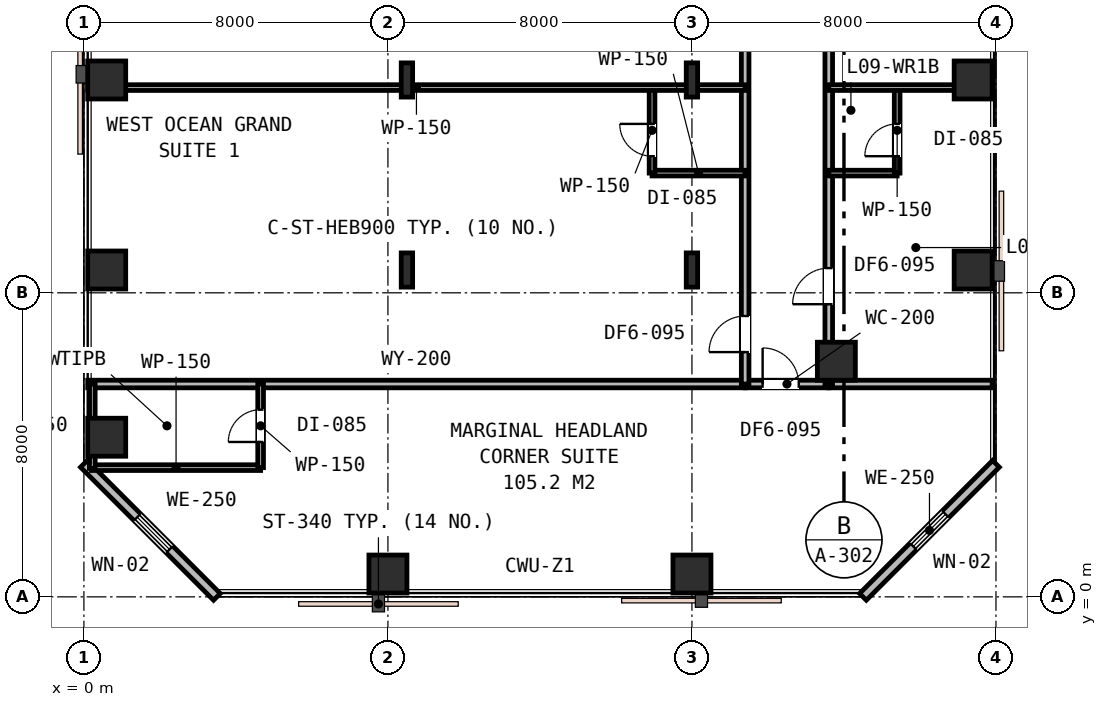
"""IFC4 building model, lengths in metres.
Left out: names, types, materials, properties, quantities, classifications, styles, units other than length and angle.
Written with IfcOpenShell. Run it as: python <this file> out.ifc"""

import sys

from ifc_helpers import new_model, si_unit, direction, frame, frame_2d, origin, origin_2d, place, context, subcontext, project, spatial, rectangle, i_section, extrude, element, fill, save


model = new_model("IFC4")
c1 = context("Model", 3, precision=1e-05, world=origin(), true_north=direction((0.0, 1.0)))
c2 = subcontext(c1, "Body", "Model", "MODEL_VIEW")
j1 = project(units=[si_unit("LENGTHUNIT", "METRE"), si_unit("PLANEANGLEUNIT", "RADIAN")], contexts=[c1])
p1 = place(None, origin())
s1 = spatial("IfcSite", under=j1, at=p1, CompositionType="ELEMENT")
p2 = place(p1, origin())
s2 = spatial("IfcBuilding", under=s1, at=p2, CompositionType="ELEMENT")
p3 = place(p2, frame((0.0, 0.0, 40.2)))
s3 = spatial("IfcBuildingStorey", under=s2, at=p3, CompositionType="ELEMENT", Elevation=40.2)
for number, where, z_axis, x_axis in (
    (1, (0.6, 8.6, 0.0), (0.0, 0.0, 1.0), (1.0, 0.0, 0.0)),
    (2, (0.6, 13.6, 0.0), (0.0, 0.0, 1.0), (1.0, 0.0, 0.0)),
    (3, (0.6, 4.2, 0.0), (0.0, 0.0, 1.0), (1.0, 0.0, 0.0)),
    (4, (8.0, 0.6, 0.0), (0.0, 0.0, 1.0), (1.0, 0.0, 0.0)),
    (5, (16.0, 0.6, 0.0), (0.0, 0.0, 1.0), (1.0, 0.0, 0.0)),
    (6, (19.8, 6.2, 0.0), (0.0, 0.0, 1.0), (1.0, 0.0, 0.0)),
    (7, (23.4, 8.6, 0.0), (0.0, 0.0, 1.0), (1.0, 0.0, 0.0)),
    (8, (23.4, 13.6, 0.0), (0.0, 0.0, 1.0), (1.0, 0.0, 0.0)),
):
    element("IfcColumn", number, at=place(p3, frame(where, z_axis=z_axis, x_axis=x_axis)), inside=s3, PredefinedType="COLUMN", context=c2, shape_type="SweptSolid", body=[
        extrude(rectangle(XDim=1.0, YDim=1.0, at=origin_2d()), origin(), (0.0, 0.0, 1.0), 3.6),
    ])
for number, where, z_axis, x_axis in (
    (9, (8.5, 8.6, 0.0), (0.0, 0.0, 1.0), (1.0, 0.0, 0.0)),
    (10, (16.0, 8.6, 0.0), (0.0, 0.0, 1.0), (1.0, 0.0, 0.0)),
    (11, (8.5, 13.6, 0.0), (0.0, 0.0, 1.0), (1.0, 0.0, 0.0)),
    (12, (16.0, 13.6, 0.0), (0.0, 0.0, 1.0), (1.0, 0.0, 0.0)),
):
    element("IfcColumn", number, at=place(p3, frame(where, z_axis=z_axis, x_axis=x_axis)), inside=s3, PredefinedType="COLUMN", context=c2, shape_type="SweptSolid", body=[
        extrude(i_section(OverallWidth=0.3, OverallDepth=0.9, WebThickness=0.018, FlangeThickness=0.035, FilletRadius=0.03, at=origin_2d()), origin(), (0.0, 0.0, 1.0), 3.6),
    ])
p4 = place(p3, frame((20.5, 0.0, 0.0), z_axis=(0.0, 0.0, 1.0), x_axis=(0.707106781187, 0.707106781187, 0.0)))
e13 = element("IfcWall", 13, at=p4, inside=s3, PredefinedType="STANDARD", context=c2, shape_type="SweptSolid", body=[
    extrude(rectangle(XDim=4.95, YDim=0.25, at=frame_2d((2.475, 0.0))), origin(), (0.0, 0.0, 1.0), 3.33),
])
p5 = place(p4, frame((1.875, 0.0, 0.85)))
e14 = element("IfcOpeningElement", 14, at=p5, cuts=e13, PredefinedType="OPENING", context=c2, shape_type="SweptSolid", body=[
    extrude(rectangle(XDim=1.2, YDim=1.6, at=frame_2d((0.6, 0.8))), frame((0.0, 0.135, 0.0), z_axis=(0.0, -1.0, 0.0), x_axis=(1.0, 0.0, 0.0)), (0.0, 0.0, 1.0), 0.27),
])
p6 = place(p3, frame((0.0, 3.5, 0.0), z_axis=(0.0, 0.0, 1.0), x_axis=(0.707106781187, -0.707106781187, 0.0)))
e15 = element("IfcWall", 15, at=p6, inside=s3, PredefinedType="STANDARD", context=c2, shape_type="SweptSolid", body=[
    extrude(rectangle(XDim=4.95, YDim=0.25, at=frame_2d((2.475, 0.0))), origin(), (0.0, 0.0, 1.0), 3.33),
])
p7 = place(p6, frame((1.985, 0.0, 0.85)))
e16 = element("IfcOpeningElement", 16, at=p7, cuts=e15, PredefinedType="OPENING", context=c2, shape_type="SweptSolid", body=[
    extrude(rectangle(XDim=1.2, YDim=1.6, at=frame_2d((0.6, 0.8))), frame((0.0, 0.135, 0.0), z_axis=(0.0, -1.0, 0.0), x_axis=(1.0, 0.0, 0.0)), (0.0, 0.0, 1.0), 0.27),
])
p8 = place(p3, frame((0.1, 5.6, 0.0), z_axis=(0.0, 0.0, 1.0), x_axis=(1.0, 0.0, 0.0)))
e17 = element("IfcWall", 17, at=p8, inside=s3, PredefinedType="PARTITIONING", context=c2, shape_type="SweptSolid", body=[
    extrude(rectangle(XDim=17.3, YDim=0.2, at=frame_2d((8.65, 0.0))), origin(), (0.0, 0.0, 1.0), 2.82),
])
p9 = place(p3, frame((19.6, 5.6, 0.0), z_axis=(0.0, 0.0, 1.0), x_axis=(1.0, 0.0, 0.0)))
e18 = element("IfcWall", 18, at=p9, inside=s3, PredefinedType="PARTITIONING", context=c2, shape_type="SweptSolid", body=[
    extrude(rectangle(XDim=4.3, YDim=0.2, at=frame_2d((2.15, 0.0))), origin(), (0.0, 0.0, 1.0), 3.33),
])
p10 = place(p3, frame((17.4, 5.6, 0.0), z_axis=(0.0, 0.0, 1.0), x_axis=(1.0, 0.0, 0.0)))
e19 = element("IfcWall", 19, at=p10, inside=s3, PredefinedType="PARTITIONING", context=c2, shape_type="SweptSolid", body=[
    extrude(rectangle(XDim=2.2, YDim=0.2, at=frame_2d((1.1, 0.0))), origin(), (0.0, 0.0, 1.0), 3.33),
])
p11 = place(p10, frame((0.46, 0.0, 0.0)))
e20 = element("IfcOpeningElement", 20, at=p11, cuts=e19, PredefinedType="OPENING", context=c2, shape_type="SweptSolid", body=[
    extrude(rectangle(XDim=0.95, YDim=2.15, at=frame_2d((0.475, 1.075))), frame((0.0, 0.11, 0.0), z_axis=(0.0, -1.0, 0.0), x_axis=(1.0, 0.0, 0.0)), (0.0, 0.0, 1.0), 0.22),
])
p12 = place(p3, frame((0.2, 3.4, 0.0), z_axis=(0.0, 0.0, 1.0), x_axis=(1.0, 0.0, 0.0)))
e21 = element("IfcWall", 21, at=p12, inside=s3, PredefinedType="PARTITIONING", context=c2, shape_type="SweptSolid", body=[
    extrude(rectangle(XDim=4.45, YDim=0.15, at=frame_2d((2.225, 0.0))), origin(), (0.0, 0.0, 1.0), 3.33),
])
p13 = place(p3, frame((4.65, 3.4, 0.0), z_axis=(0.0, 0.0, 1.0), x_axis=(0.0, 1.0, 0.0)))
e22 = element("IfcWall", 22, at=p13, inside=s3, PredefinedType="PARTITIONING", context=c2, shape_type="SweptSolid", body=[
    extrude(rectangle(XDim=2.2, YDim=0.15, at=frame_2d((1.1, 0.0))), origin(), (0.0, 0.0, 1.0), 3.33),
])
p14 = place(p13, frame((0.675, 0.0, 0.0)))
e23 = element("IfcOpeningElement", 23, at=p14, cuts=e22, PredefinedType="OPENING", context=c2, shape_type="SweptSolid", body=[
    extrude(rectangle(XDim=0.85, YDim=2.15, at=frame_2d((0.425, 1.075))), frame((0.0, 0.085, 0.0), z_axis=(0.0, -1.0, 0.0), x_axis=(1.0, 0.0, 0.0)), (0.0, 0.0, 1.0), 0.17),
])
p15 = place(p3, frame((0.22, 3.38, 0.0), z_axis=(0.0, 0.0, 1.0), x_axis=(0.0, 1.0, 0.0)))
e24 = element("IfcWall", 24, at=p15, inside=s3, PredefinedType="PARTITIONING", context=c2, shape_type="SweptSolid", body=[
    extrude(rectangle(XDim=2.22, YDim=0.15, at=frame_2d((1.11, 0.0))), origin(), (0.0, 0.0, 1.0), 2.93),
])
p16 = place(p3, frame((17.4, 5.6, 0.0), z_axis=(0.0, 0.0, 1.0), x_axis=(0.0, 1.0, 0.0)))
e25 = element("IfcWall", 25, at=p16, inside=s3, PredefinedType="PARTITIONING", context=c2, shape_type="SweptSolid", body=[
    extrude(rectangle(XDim=23.0, YDim=0.2, at=frame_2d((11.5, 0.0))), origin(), (0.0, 0.0, 1.0), 2.82),
])
p17 = place(p16, frame((0.84, 0.0, 0.0)))
e26 = element("IfcOpeningElement", 26, at=p17, cuts=e25, PredefinedType="OPENING", context=c2, shape_type="SweptSolid", body=[
    extrude(rectangle(XDim=0.95, YDim=2.15, at=frame_2d((0.475, 1.075))), frame((0.0, 0.11, 0.0), z_axis=(0.0, -1.0, 0.0), x_axis=(1.0, 0.0, 0.0)), (0.0, 0.0, 1.0), 0.22),
])
p18 = place(p16, frame((8.983, 0.0, 0.0)))
e27 = element("IfcOpeningElement", 27, at=p18, cuts=e25, PredefinedType="OPENING", context=c2, shape_type="SweptSolid", body=[
    extrude(rectangle(XDim=0.95, YDim=2.15, at=frame_2d((0.475, 1.075))), frame((0.0, 0.11, 0.0), z_axis=(0.0, -1.0, 0.0), x_axis=(1.0, 0.0, 0.0)), (0.0, 0.0, 1.0), 0.22),
])
p19 = place(p16, frame((16.476, 0.0, 0.0)))
e28 = element("IfcOpeningElement", 28, at=p19, cuts=e25, PredefinedType="OPENING", context=c2, shape_type="SweptSolid", body=[
    extrude(rectangle(XDim=0.95, YDim=2.15, at=frame_2d((0.475, 1.075))), frame((0.0, 0.11, 0.0), z_axis=(0.0, -1.0, 0.0), x_axis=(1.0, 0.0, 0.0)), (0.0, 0.0, 1.0), 0.22),
])
p20 = place(p3, frame((14.95, 11.15, 0.0), z_axis=(0.0, 0.0, 1.0), x_axis=(1.0, 0.0, 0.0)))
e29 = element("IfcWall", 29, at=p20, inside=s3, PredefinedType="PARTITIONING", context=c2, shape_type="SweptSolid", body=[
    extrude(rectangle(XDim=2.45, YDim=0.15, at=frame_2d((1.225, 0.0))), origin(), (0.0, 0.0, 1.0), 2.82),
])
p21 = place(p3, frame((14.95, 11.15, 0.0), z_axis=(0.0, 0.0, 1.0), x_axis=(0.0, 1.0, 0.0)))
e30 = element("IfcWall", 30, at=p21, inside=s3, PredefinedType="PARTITIONING", context=c2, shape_type="SweptSolid", body=[
    extrude(rectangle(XDim=2.25, YDim=0.15, at=frame_2d((1.125, 0.0))), origin(), (0.0, 0.0, 1.0), 2.82),
])
p22 = place(p21, frame((0.444, 0.0, 0.0)))
e31 = element("IfcOpeningElement", 31, at=p22, cuts=e30, PredefinedType="OPENING", context=c2, shape_type="SweptSolid", body=[
    extrude(rectangle(XDim=0.85, YDim=2.15, at=frame_2d((0.425, 1.075))), frame((0.0, 0.085, 0.0), z_axis=(0.0, -1.0, 0.0), x_axis=(1.0, 0.0, 0.0)), (0.0, 0.0, 1.0), 0.17),
])
p23 = place(p3, frame((0.1, 13.4, 0.0), z_axis=(0.0, 0.0, 1.0), x_axis=(1.0, 0.0, 0.0)))
e32 = element("IfcWall", 32, at=p23, inside=s3, PredefinedType="PARTITIONING", context=c2, shape_type="SweptSolid", body=[
    extrude(rectangle(XDim=17.3, YDim=0.15, at=frame_2d((8.65, 0.0))), origin(), (0.0, 0.0, 1.0), 2.82),
])
p24 = place(p3, frame((19.6, 5.6, 0.0), z_axis=(0.0, 0.0, 1.0), x_axis=(0.0, 1.0, 0.0)))
e33 = element("IfcWall", 33, at=p24, inside=s3, PredefinedType="PARTITIONING", context=c2, shape_type="SweptSolid", body=[
    extrude(rectangle(XDim=23.0, YDim=0.2, at=frame_2d((11.5, 0.0))), origin(), (0.0, 0.0, 1.0), 2.82),
])
p25 = place(p24, frame((2.1, 0.0, 0.0)))
e34 = element("IfcOpeningElement", 34, at=p25, cuts=e33, PredefinedType="OPENING", context=c2, shape_type="SweptSolid", body=[
    extrude(rectangle(XDim=0.95, YDim=2.15, at=frame_2d((0.475, 1.075))), frame((0.0, 0.11, 0.0), z_axis=(0.0, -1.0, 0.0), x_axis=(1.0, 0.0, 0.0)), (0.0, 0.0, 1.0), 0.22),
])
p26 = place(p24, frame((9.81, 0.0, 0.0)))
e35 = element("IfcOpeningElement", 35, at=p26, cuts=e33, PredefinedType="OPENING", context=c2, shape_type="SweptSolid", body=[
    extrude(rectangle(XDim=0.95, YDim=2.15, at=frame_2d((0.475, 1.075))), frame((0.0, 0.11, 0.0), z_axis=(0.0, -1.0, 0.0), x_axis=(1.0, 0.0, 0.0)), (0.0, 0.0, 1.0), 0.22),
])
p27 = place(p24, frame((17.41, 0.0, 0.0)))
e36 = element("IfcOpeningElement", 36, at=p27, cuts=e33, PredefinedType="OPENING", context=c2, shape_type="SweptSolid", body=[
    extrude(rectangle(XDim=0.95, YDim=2.15, at=frame_2d((0.475, 1.075))), frame((0.0, 0.11, 0.0), z_axis=(0.0, -1.0, 0.0), x_axis=(1.0, 0.0, 0.0)), (0.0, 0.0, 1.0), 0.22),
])
p28 = place(p3, frame((19.6, 11.15, 0.0), z_axis=(0.0, 0.0, 1.0), x_axis=(1.0, 0.0, 0.0)))
e37 = element("IfcWall", 37, at=p28, inside=s3, PredefinedType="PARTITIONING", context=c2, shape_type="SweptSolid", body=[
    extrude(rectangle(XDim=1.8, YDim=0.15, at=frame_2d((0.9, 0.0))), origin(), (0.0, 0.0, 1.0), 2.96),
])
p29 = place(p3, frame((21.4, 11.15, 0.0), z_axis=(0.0, 0.0, 1.0), x_axis=(0.0, 1.0, 0.0)))
e38 = element("IfcWall", 38, at=p29, inside=s3, PredefinedType="PARTITIONING", context=c2, shape_type="SweptSolid", body=[
    extrude(rectangle(XDim=2.25, YDim=0.15, at=frame_2d((1.125, 0.0))), origin(), (0.0, 0.0, 1.0), 2.82),
])
p30 = place(p29, frame((0.444, 0.0, 0.0)))
e39 = element("IfcOpeningElement", 39, at=p30, cuts=e38, PredefinedType="OPENING", context=c2, shape_type="SweptSolid", body=[
    extrude(rectangle(XDim=0.85, YDim=2.15, at=frame_2d((0.425, 1.075))), frame((0.0, 0.085, 0.0), z_axis=(0.0, -1.0, 0.0), x_axis=(1.0, 0.0, 0.0)), (0.0, 0.0, 1.0), 0.17),
])
p31 = place(p3, frame((19.6, 13.4, 0.0), z_axis=(0.0, 0.0, 1.0), x_axis=(1.0, 0.0, 0.0)))
e40 = element("IfcWall", 40, at=p31, inside=s3, PredefinedType="PARTITIONING", context=c2, shape_type="SweptSolid", body=[
    extrude(rectangle(XDim=4.3, YDim=0.15, at=frame_2d((2.15, 0.0))), origin(), (0.0, 0.0, 1.0), 2.82),
])
p32 = place(p5, origin())
e41 = element("IfcWindow", 41, at=p32, inside=s3, PartitioningType="SINGLE_PANEL", PredefinedType="WINDOW", context=c2, shape_type="SweptSolid", body=[
    extrude(rectangle(XDim=1.2, YDim=1.6, at=frame_2d((0.6, 0.8))), frame((0.0, 0.03, 0.0), z_axis=(0.0, -1.0, 0.0), x_axis=(1.0, 0.0, 0.0)), (0.0, 0.0, 1.0), 0.06),
])
fill(e14, e41)
p33 = place(p7, origin())
e42 = element("IfcWindow", 42, at=p33, inside=s3, PartitioningType="SINGLE_PANEL", PredefinedType="WINDOW", context=c2, shape_type="SweptSolid", body=[
    extrude(rectangle(XDim=1.2, YDim=1.6, at=frame_2d((0.6, 0.8))), frame((0.0, 0.03, 0.0), z_axis=(0.0, -1.0, 0.0), x_axis=(1.0, 0.0, 0.0)), (0.0, 0.0, 1.0), 0.06),
])
fill(e16, e42)
p34 = place(p11, origin())
e43 = element("IfcDoor", 43, at=p34, inside=s3, OperationType="SINGLE_SWING_LEFT", PredefinedType="DOOR", context=c2, shape_type="SweptSolid", body=[
    extrude(rectangle(XDim=0.95, YDim=2.15, at=frame_2d((0.475, 1.075))), frame((0.0, 0.025, 0.0), z_axis=(0.0, -1.0, 0.0), x_axis=(1.0, 0.0, 0.0)), (0.0, 0.0, 1.0), 0.05),
])
fill(e20, e43)
p35 = place(p14, origin())
e44 = element("IfcDoor", 44, at=p35, inside=s3, OperationType="SINGLE_SWING_LEFT", PredefinedType="DOOR", context=c2, shape_type="SweptSolid", body=[
    extrude(rectangle(XDim=0.85, YDim=2.15, at=frame_2d((0.425, 1.075))), frame((0.0, 0.025, 0.0), z_axis=(0.0, -1.0, 0.0), x_axis=(1.0, 0.0, 0.0)), (0.0, 0.0, 1.0), 0.05),
])
fill(e23, e44)
p36 = place(p17, origin())
e45 = element("IfcDoor", 45, at=p36, inside=s3, OperationType="SINGLE_SWING_LEFT", PredefinedType="DOOR", context=c2, shape_type="SweptSolid", body=[
    extrude(rectangle(XDim=0.95, YDim=2.15, at=frame_2d((0.475, 1.075))), frame((0.0, 0.025, 0.0), z_axis=(0.0, -1.0, 0.0), x_axis=(1.0, 0.0, 0.0)), (0.0, 0.0, 1.0), 0.05),
])
fill(e26, e45)
p37 = place(p22, origin())
e46 = element("IfcDoor", 46, at=p37, inside=s3, OperationType="SINGLE_SWING_RIGHT", PredefinedType="DOOR", context=c2, shape_type="SweptSolid", body=[
    extrude(rectangle(XDim=0.85, YDim=2.15, at=frame_2d((0.425, 1.075))), frame((0.0, 0.025, 0.0), z_axis=(0.0, -1.0, 0.0), x_axis=(1.0, 0.0, 0.0)), (0.0, 0.0, 1.0), 0.05),
])
fill(e31, e46)
p38 = place(p25, origin())
e47 = element("IfcDoor", 47, at=p38, inside=s3, OperationType="SINGLE_SWING_LEFT", PredefinedType="DOOR", context=c2, shape_type="SweptSolid", body=[
    extrude(rectangle(XDim=0.95, YDim=2.15, at=frame_2d((0.475, 1.075))), frame((0.0, 0.025, 0.0), z_axis=(0.0, -1.0, 0.0), x_axis=(1.0, 0.0, 0.0)), (0.0, 0.0, 1.0), 0.05),
])
fill(e34, e47)
p39 = place(p30, origin())
e48 = element("IfcDoor", 48, at=p39, inside=s3, OperationType="SINGLE_SWING_LEFT", PredefinedType="DOOR", context=c2, shape_type="SweptSolid", body=[
    extrude(rectangle(XDim=0.85, YDim=2.15, at=frame_2d((0.425, 1.075))), frame((0.0, 0.025, 0.0), z_axis=(0.0, -1.0, 0.0), x_axis=(1.0, 0.0, 0.0)), (0.0, 0.0, 1.0), 0.05),
])
fill(e39, e48)
save(model, sys.argv[1])
